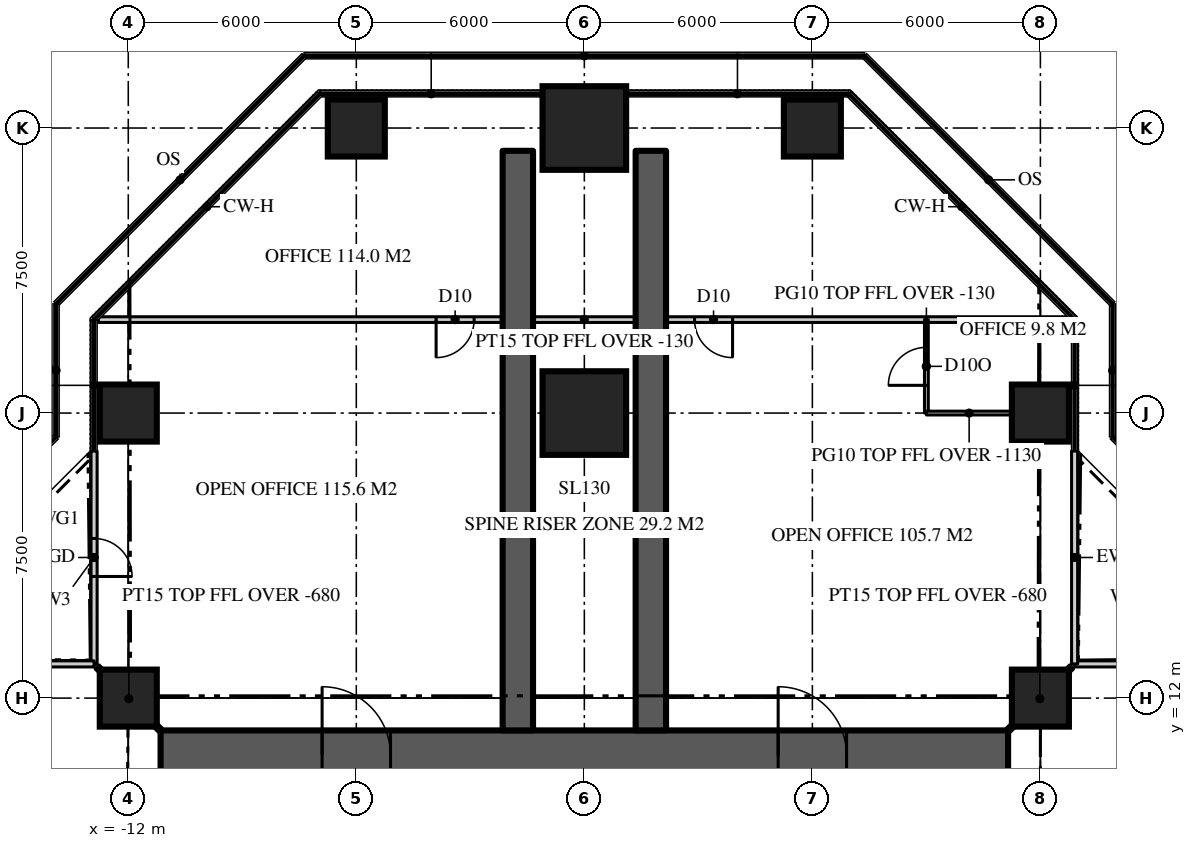
"""IFC4 building model, lengths in metres.
Left out: names, types, materials, properties, quantities, classifications, styles, units other than length and angle.
Written with IfcOpenShell. Run it as: python <this file> out.ifc"""

import sys

from ifc_helpers import new_model, si_unit, direction, frame, frame_2d, origin, origin_2d, place, context, subcontext, project, spatial, rectangle, extrude, element, fill, save


model = new_model("IFC4")
c1 = context("Model", 3, precision=1e-05, world=origin(), true_north=direction((0.0, 1.0)))
c2 = subcontext(c1, "Body", "Model", "MODEL_VIEW")
j1 = project(units=[si_unit("LENGTHUNIT", "METRE"), si_unit("PLANEANGLEUNIT", "RADIAN")], contexts=[c1])
p1 = place(None, origin())
s1 = spatial("IfcSite", under=j1, at=p1, CompositionType="ELEMENT")
p2 = place(p1, origin())
s2 = spatial("IfcBuilding", under=s1, at=p2, CompositionType="ELEMENT")
p3 = place(p2, frame((0.0, 0.0, 216.6)))
s3 = spatial("IfcBuildingStorey", under=s2, at=p3, CompositionType="ELEMENT", Elevation=216.6)
p4 = place(p3, frame((-11.15, 10.5, 0.0), z_axis=(0.0, 0.0, 1.0), x_axis=(1.0, 0.0, 0.0)))
e1 = element("IfcWall", 1, at=p4, inside=s3, PredefinedType="SHEAR", context=c2, shape_type="SweptSolid", body=[
    extrude(rectangle(XDim=22.3, YDim=1.3, at=frame_2d((11.15, 0.0))), origin(), (0.0, 0.0, 1.0), 3.9),
])
p5 = place(p4, frame((4.25, 0.0, 0.0)))
e2 = element("IfcOpeningElement", 2, at=p5, cuts=e1, PredefinedType="OPENING", context=c2, shape_type="SweptSolid", body=[
    extrude(rectangle(XDim=1.8, YDim=2.2, at=frame_2d((0.9, 1.1))), frame((0.0, 0.66, 0.0), z_axis=(0.0, -1.0, 0.0), x_axis=(1.0, 0.0, 0.0)), (0.0, 0.0, 1.0), 1.32),
])
p6 = place(p4, frame((16.25, 0.0, 0.0)))
e3 = element("IfcOpeningElement", 3, at=p6, cuts=e1, PredefinedType="OPENING", context=c2, shape_type="SweptSolid", body=[
    extrude(rectangle(XDim=1.8, YDim=2.2, at=frame_2d((0.9, 1.1))), frame((0.0, 0.66, 0.0), z_axis=(0.0, -1.0, 0.0), x_axis=(1.0, 0.0, 0.0)), (0.0, 0.0, 1.0), 1.32),
])
for number, where, z_axis, x_axis in (
    (4, (1.75, 11.15, 0.0), (0.0, 0.0, 1.0), (0.0, 1.0, 0.0)),
    (5, (-1.75, 11.15, 0.0), (0.0, 0.0, 1.0), (0.0, 1.0, 0.0)),
):
    element("IfcWall", number, at=place(p3, frame(where, z_axis=z_axis, x_axis=x_axis)), inside=s3, PredefinedType="SHEAR", context=c2, shape_type="SweptSolid", body=[
        extrude(rectangle(XDim=15.25, YDim=0.8, at=frame_2d((7.625, 0.0))), origin(), (0.0, 0.0, 1.0), 3.9),
    ])
for number, where, z_axis, x_axis in (
    (6, (-12.0, 12.0, 0.0), (0.0, 0.0, 1.0), (1.0, 0.0, 0.0)),
    (7, (12.0, 12.0, 0.0), (0.0, 0.0, 1.0), (1.0, 0.0, 0.0)),
    (8, (-12.0, 19.5, 0.0), (0.0, 0.0, 1.0), (1.0, 0.0, 0.0)),
):
    element("IfcColumn", number, at=place(p3, frame(where, z_axis=z_axis, x_axis=x_axis)), inside=s3, PredefinedType="COLUMN", context=c2, shape_type="SweptSolid", body=[
        extrude(rectangle(XDim=1.5, YDim=1.5, at=origin_2d()), origin(), (0.0, 0.0, 1.0), 3.9),
    ])
p7 = place(p3, frame((0.0, 19.5, 0.0), z_axis=(0.0, 0.0, 1.0), x_axis=(1.0, 0.0, 0.0)))
e9 = element("IfcColumn", 9, at=p7, inside=s3, PredefinedType="COLUMN", context=c2, shape_type="SweptSolid", body=[
    extrude(rectangle(XDim=2.2, YDim=2.2, at=origin_2d()), origin(), (0.0, 0.0, 1.0), 3.9),
])
for number, where, z_axis, x_axis in (
    (10, (12.0, 19.5, 0.0), (0.0, 0.0, 1.0), (1.0, 0.0, 0.0)),
    (11, (-6.0, 27.0, 0.0), (0.0, 0.0, 1.0), (1.0, 0.0, 0.0)),
):
    element("IfcColumn", number, at=place(p3, frame(where, z_axis=z_axis, x_axis=x_axis)), inside=s3, PredefinedType="COLUMN", context=c2, shape_type="SweptSolid", body=[
        extrude(rectangle(XDim=1.5, YDim=1.5, at=origin_2d()), origin(), (0.0, 0.0, 1.0), 3.9),
    ])
p8 = place(p3, frame((0.0, 27.0, 0.0), z_axis=(0.0, 0.0, 1.0), x_axis=(1.0, 0.0, 0.0)))
e12 = element("IfcColumn", 12, at=p8, inside=s3, PredefinedType="COLUMN", context=c2, shape_type="SweptSolid", body=[
    extrude(rectangle(XDim=2.2, YDim=2.2, at=origin_2d()), origin(), (0.0, 0.0, 1.0), 3.9),
])
p9 = place(p3, frame((6.0, 27.0, 0.0), z_axis=(0.0, 0.0, 1.0), x_axis=(1.0, 0.0, 0.0)))
e13 = element("IfcColumn", 13, at=p9, inside=s3, PredefinedType="COLUMN", context=c2, shape_type="SweptSolid", body=[
    extrude(rectangle(XDim=1.5, YDim=1.5, at=origin_2d()), origin(), (0.0, 0.0, 1.0), 3.9),
])
p10 = place(p3, frame((18.5, 12.9, 0.0), z_axis=(0.0, 0.0, 1.0), x_axis=(-1.0, 0.0, 0.0)))
e14 = element("IfcWall", 14, at=p10, inside=s3, PredefinedType="SOLIDWALL", context=c2, shape_type="SweptSolid", body=[
    extrude(rectangle(XDim=5.6, YDim=0.16, at=frame_2d((2.8, 0.0))), origin(), (0.0, 0.0, 1.0), 3.77),
])
p11 = place(p10, frame((2.3, 0.0, 0.0)))
e15 = element("IfcOpeningElement", 15, at=p11, cuts=e14, PredefinedType="OPENING", context=c2, shape_type="SweptSolid", body=[
    extrude(rectangle(XDim=1.0, YDim=2.2, at=frame_2d((0.5, 1.1))), frame((0.0, 0.09, 0.0), z_axis=(0.0, -1.0, 0.0), x_axis=(1.0, 0.0, 0.0)), (0.0, 0.0, 1.0), 0.18),
])
p12 = place(p3, frame((12.9, 12.9, 0.0), z_axis=(0.0, 0.0, 1.0), x_axis=(0.0, 1.0, 0.0)))
e16 = element("IfcWall", 16, at=p12, inside=s3, PredefinedType="SOLIDWALL", context=c2, shape_type="SweptSolid", body=[
    extrude(rectangle(XDim=5.6, YDim=0.16, at=frame_2d((2.8, 0.0))), origin(), (0.0, 0.0, 1.0), 3.77),
])
p13 = place(p3, frame((-12.9, 18.5, 0.0), z_axis=(0.0, 0.0, 1.0), x_axis=(0.0, -1.0, 0.0)))
e17 = element("IfcWall", 17, at=p13, inside=s3, PredefinedType="SOLIDWALL", context=c2, shape_type="SweptSolid", body=[
    extrude(rectangle(XDim=5.6, YDim=0.16, at=frame_2d((2.8, 0.0))), origin(), (0.0, 0.0, 1.0), 3.77),
])
p14 = place(p13, frame((2.3, 0.0, 0.0)))
e18 = element("IfcOpeningElement", 18, at=p14, cuts=e17, PredefinedType="OPENING", context=c2, shape_type="SweptSolid", body=[
    extrude(rectangle(XDim=1.0, YDim=2.2, at=frame_2d((0.5, 1.1))), frame((0.0, 0.09, 0.0), z_axis=(0.0, -1.0, 0.0), x_axis=(1.0, 0.0, 0.0)), (0.0, 0.0, 1.0), 0.18),
])
p15 = place(p3, frame((-12.9, 12.9, 0.0), z_axis=(0.0, 0.0, 1.0), x_axis=(-1.0, 0.0, 0.0)))
e19 = element("IfcWall", 19, at=p15, inside=s3, PredefinedType="SOLIDWALL", context=c2, shape_type="SweptSolid", body=[
    extrude(rectangle(XDim=5.6, YDim=0.16, at=frame_2d((2.8, 0.0))), origin(), (0.0, 0.0, 1.0), 3.77),
])
p16 = place(p3, frame((12.786, 21.959, 0.0), z_axis=(0.0, 0.0, 1.0), x_axis=(-1.0, 0.0, 0.0)))
e20 = element("IfcWall", 20, at=p16, inside=s3, PredefinedType="PARTITIONING", context=c2, shape_type="SweptSolid", body=[
    extrude(rectangle(XDim=25.573, YDim=0.15, at=frame_2d((12.786, 0.0))), origin(), (0.0, 0.0, 1.0), 3.77),
])
p17 = place(p16, frame((15.687, 0.0, 0.0)))
e21 = element("IfcOpeningElement", 21, at=p17, cuts=e20, PredefinedType="OPENING", context=c2, shape_type="SweptSolid", body=[
    extrude(rectangle(XDim=1.0, YDim=2.2, at=frame_2d((0.5, 1.1))), frame((0.0, 0.085, 0.0), z_axis=(0.0, -1.0, 0.0), x_axis=(1.0, 0.0, 0.0)), (0.0, 0.0, 1.0), 0.17),
])
p18 = place(p16, frame((8.886, 0.0, 0.0)))
e22 = element("IfcOpeningElement", 22, at=p18, cuts=e20, PredefinedType="OPENING", context=c2, shape_type="SweptSolid", body=[
    extrude(rectangle(XDim=1.0, YDim=2.2, at=frame_2d((0.5, 1.1))), frame((0.0, 0.085, 0.0), z_axis=(0.0, -1.0, 0.0), x_axis=(1.0, 0.0, 0.0)), (0.0, 0.0, 1.0), 0.17),
])
p19 = place(p3, frame((9.0, 19.5, 0.0), z_axis=(0.0, 0.0, 1.0), x_axis=(0.0, 1.0, 0.0)))
e23 = element("IfcWall", 23, at=p19, inside=s3, PredefinedType="PARTITIONING", context=c2, shape_type="SweptSolid", body=[
    extrude(rectangle(XDim=2.459, YDim=0.1, at=frame_2d((1.229, 0.0))), origin(), (0.0, 0.0, 1.0), 3.77),
])
p20 = place(p19, frame((0.729, 0.0, 0.0)))
e24 = element("IfcOpeningElement", 24, at=p20, cuts=e23, PredefinedType="OPENING", context=c2, shape_type="SweptSolid", body=[
    extrude(rectangle(XDim=1.0, YDim=2.2, at=frame_2d((0.5, 1.1))), frame((0.0, 0.06, 0.0), z_axis=(0.0, -1.0, 0.0), x_axis=(1.0, 0.0, 0.0)), (0.0, 0.0, 1.0), 0.12),
])
p21 = place(p3, frame((9.0, 19.5, 0.0), z_axis=(0.0, 0.0, 1.0), x_axis=(1.0, 0.0, 0.0)))
e25 = element("IfcWall", 25, at=p21, inside=s3, PredefinedType="PARTITIONING", context=c2, shape_type="SweptSolid", body=[
    extrude(rectangle(XDim=2.25, YDim=0.1, at=frame_2d((1.125, 0.0))), origin(), (0.0, 0.0, 1.0), 2.77),
])
for number, where, z_axis, x_axis in (
    (26, (11.15, 11.15, 0.0), (0.0, 0.0, 1.0), (0.707, 0.707, 0.0)),
    (27, (-11.15, 11.15, 0.0), (0.0, 0.0, 1.0), (-0.707, 0.707, 0.0)),
):
    element("IfcWall", number, at=place(p3, frame(where, z_axis=z_axis, x_axis=x_axis)), inside=s3, PredefinedType="PARTITIONING", context=c2, shape_type="SweptSolid", body=[
        extrude(rectangle(XDim=2.362, YDim=0.15, at=frame_2d((1.181, 0.0))), origin(), (0.0, 0.0, 1.0), 3.22),
    ])
p22 = place(p14, origin())
e28 = element("IfcDoor", 28, at=p22, inside=s3, OperationType="SINGLE_SWING_RIGHT", PredefinedType="DOOR", context=c2, shape_type="SweptSolid", body=[
    extrude(rectangle(XDim=1.0, YDim=2.2, at=frame_2d((0.5, 1.1))), frame((0.0, 0.025, 0.0), z_axis=(0.0, -1.0, 0.0), x_axis=(1.0, 0.0, 0.0)), (0.0, 0.0, 1.0), 0.05),
])
fill(e18, e28)
p23 = place(p5, origin())
e29 = element("IfcDoor", 29, at=p23, inside=s3, OperationType="DOUBLE_DOOR_DOUBLE_SWING", PredefinedType="DOOR", context=c2, shape_type="SweptSolid", body=[
    extrude(rectangle(XDim=1.8, YDim=2.2, at=frame_2d((0.9, 1.1))), frame((0.0, 0.025, 0.0), z_axis=(0.0, -1.0, 0.0), x_axis=(1.0, 0.0, 0.0)), (0.0, 0.0, 1.0), 0.05),
])
fill(e2, e29)
p24 = place(p6, origin())
e30 = element("IfcDoor", 30, at=p24, inside=s3, OperationType="DOUBLE_DOOR_DOUBLE_SWING", PredefinedType="DOOR", context=c2, shape_type="SweptSolid", body=[
    extrude(rectangle(XDim=1.8, YDim=2.2, at=frame_2d((0.9, 1.1))), frame((0.0, 0.025, 0.0), z_axis=(0.0, -1.0, 0.0), x_axis=(1.0, 0.0, 0.0)), (0.0, 0.0, 1.0), 0.05),
])
fill(e3, e30)
p25 = place(p17, origin())
e31 = element("IfcDoor", 31, at=p25, inside=s3, OperationType="SINGLE_SWING_RIGHT", PredefinedType="DOOR", context=c2, shape_type="SweptSolid", body=[
    extrude(rectangle(XDim=1.0, YDim=2.2, at=frame_2d((0.5, 1.1))), frame((0.0, 0.025, 0.0), z_axis=(0.0, -1.0, 0.0), x_axis=(1.0, 0.0, 0.0)), (0.0, 0.0, 1.0), 0.05),
])
fill(e21, e31)
p26 = place(p18, origin())
e32 = element("IfcDoor", 32, at=p26, inside=s3, OperationType="SINGLE_SWING_LEFT", PredefinedType="DOOR", context=c2, shape_type="SweptSolid", body=[
    extrude(rectangle(XDim=1.0, YDim=2.2, at=frame_2d((0.5, 1.1))), frame((0.0, 0.025, 0.0), z_axis=(0.0, -1.0, 0.0), x_axis=(1.0, 0.0, 0.0)), (0.0, 0.0, 1.0), 0.05),
])
fill(e22, e32)
p27 = place(p20, origin())
e33 = element("IfcDoor", 33, at=p27, inside=s3, OperationType="SINGLE_SWING_LEFT", PredefinedType="DOOR", context=c2, shape_type="SweptSolid", body=[
    extrude(rectangle(XDim=1.0, YDim=2.2, at=frame_2d((0.5, 1.1))), frame((0.0, 0.025, 0.0), z_axis=(0.0, -1.0, 0.0), x_axis=(1.0, 0.0, 0.0)), (0.0, 0.0, 1.0), 0.05),
])
fill(e24, e33)
save(model, sys.argv[1])
